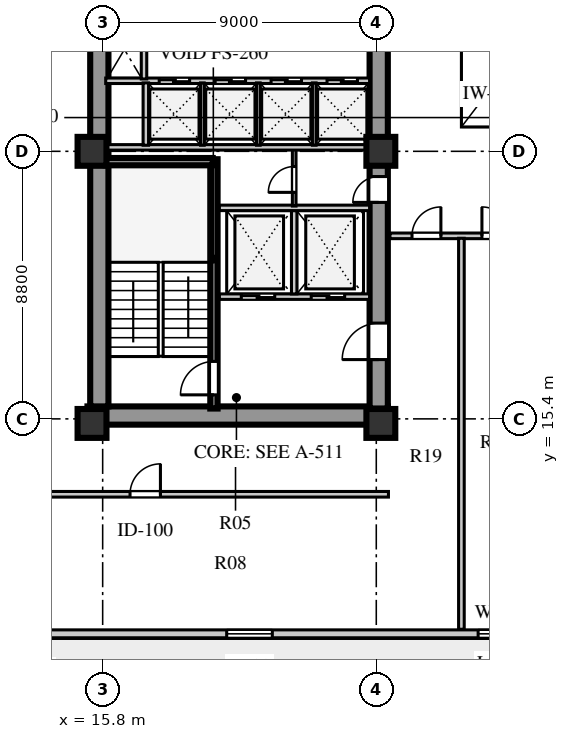
"""IFC4 building model, lengths in metres.
Left out: names, types, materials, properties, quantities, classifications, styles, units other than length and angle.
Written with IfcOpenShell. Run it as: python <this file> out.ifc"""

import sys

from ifc_helpers import new_model, si_unit, direction, frame, frame_2d, origin, origin_2d, place, context, subcontext, project, spatial, rectangle, extrude, element, fill, save


model = new_model("IFC4")
c1 = context("Model", 3, precision=1e-05, world=origin(), true_north=direction((0.0, 1.0)))
c2 = subcontext(c1, "Body", "Model", "MODEL_VIEW")
j1 = project(units=[si_unit("LENGTHUNIT", "METRE"), si_unit("PLANEANGLEUNIT", "RADIAN")], contexts=[c1])
p1 = place(None, origin())
s1 = spatial("IfcSite", under=j1, at=p1, CompositionType="ELEMENT")
p2 = place(p1, origin())
s2 = spatial("IfcBuilding", under=s1, at=p2, CompositionType="ELEMENT")
p3 = place(p2, frame((0.0, 0.0, 82.0)))
s3 = spatial("IfcBuildingStorey", under=s2, at=p3, CompositionType="ELEMENT", Elevation=82.0)
p4 = place(p3, frame((15.3, 15.51, 0.0), z_axis=(0.0, 0.0, 1.0), x_axis=(1.0, 0.0, 0.0)))
e1 = element("IfcWall", 1, at=p4, inside=s3, PredefinedType="SHEAR", context=c2, shape_type="SweptSolid", body=[
    extrude(rectangle(XDim=9.88, YDim=0.6, at=frame_2d((4.94, 0.0))), origin(), (0.0, 0.0, 1.0), 3.74),
])
p5 = place(p3, frame((15.69, 15.81, 0.0), z_axis=(0.0, 0.0, 1.0), x_axis=(0.0, 1.0, 0.0)))
e2 = element("IfcWall", 2, at=p5, inside=s3, PredefinedType="SHEAR", context=c2, shape_type="SweptSolid", body=[
    extrude(rectangle(XDim=25.63, YDim=0.6, at=frame_2d((12.815, 0.0))), origin(), (0.0, 0.0, 1.0), 3.74),
])
p6 = place(p3, frame((24.88, 15.74, 0.0), z_axis=(0.0, 0.0, 1.0), x_axis=(0.0, 1.0, 0.0)))
e3 = element("IfcWall", 3, at=p6, inside=s3, PredefinedType="SHEAR", context=c2, shape_type="SweptSolid", body=[
    extrude(rectangle(XDim=25.76, YDim=0.6, at=frame_2d((12.88, 0.0))), origin(), (0.0, 0.0, 1.0), 3.74),
])
p7 = place(p6, frame((1.61, 0.0, 0.0)))
e4 = element("IfcOpeningElement", 4, at=p7, cuts=e3, PredefinedType="OPENING", context=c2, shape_type="SweptSolid", body=[
    extrude(rectangle(XDim=1.2, YDim=2.1, at=frame_2d((0.6, 1.05))), frame((0.0, 0.31, 0.0), z_axis=(0.0, -1.0, 0.0), x_axis=(1.0, 0.0, 0.0)), (0.0, 0.0, 1.0), 0.62),
])
p8 = place(p6, frame((6.78, 0.0, 0.0)))
e5 = element("IfcOpeningElement", 5, at=p8, cuts=e3, PredefinedType="OPENING", context=c2, shape_type="SweptSolid", body=[
    extrude(rectangle(XDim=0.85, YDim=2.06, at=frame_2d((0.425, 1.03))), frame((0.0, 0.31, 0.0), z_axis=(0.0, -1.0, 0.0), x_axis=(1.0, 0.0, 0.0)), (0.0, 0.0, 1.0), 0.62),
])
p9 = place(p6, frame((12.11, 0.0, 0.0)))
e6 = element("IfcOpeningElement", 6, at=p9, cuts=e3, PredefinedType="OPENING", context=c2, shape_type="SweptSolid", body=[
    extrude(rectangle(XDim=1.5, YDim=2.12, at=frame_2d((0.75, 1.06))), frame((0.0, 0.31, 0.0), z_axis=(0.0, -1.0, 0.0), x_axis=(1.0, 0.0, 0.0)), (0.0, 0.0, 1.0), 0.62),
])
p10 = place(p6, frame((20.11, 0.0, 0.0)))
e7 = element("IfcOpeningElement", 7, at=p10, cuts=e3, PredefinedType="OPENING", context=c2, shape_type="SweptSolid", body=[
    extrude(rectangle(XDim=1.2, YDim=2.12, at=frame_2d((0.6, 1.06))), frame((0.0, 0.31, 0.0), z_axis=(0.0, -1.0, 0.0), x_axis=(1.0, 0.0, 0.0)), (0.0, 0.0, 1.0), 0.62),
])
p11 = place(p6, frame((24.01, 0.0, 0.0)))
e8 = element("IfcOpeningElement", 8, at=p11, cuts=e3, PredefinedType="OPENING", context=c2, shape_type="SweptSolid", body=[
    extrude(rectangle(XDim=0.95, YDim=2.1, at=frame_2d((0.475, 1.05))), frame((0.0, 0.31, 0.0), z_axis=(0.0, -1.0, 0.0), x_axis=(1.0, 0.0, 0.0)), (0.0, 0.0, 1.0), 0.62),
])
for number, where, z_axis, x_axis in (
    (9, (15.45, 15.25, 0.0), (0.0, 0.0, 1.0), (1.0, 0.0, 0.0)),
    (10, (15.45, 24.2, 0.0), (0.0, 0.0, 1.0), (1.0, 0.0, 0.0)),
    (11, (24.95, 15.25, 0.0), (0.0, 0.0, 1.0), (1.0, 0.0, 0.0)),
    (12, (24.95, 24.2, 0.0), (0.0, 0.0, 1.0), (1.0, 0.0, 0.0)),
):
    element("IfcColumn", number, at=place(p3, frame(where, z_axis=z_axis, x_axis=x_axis)), inside=s3, PredefinedType="COLUMN", context=c2, shape_type="SweptSolid", body=[
        extrude(rectangle(XDim=0.95, YDim=0.95, at=origin_2d()), origin(), (0.0, 0.0, 1.0), 3.74),
    ])
p12 = place(p3, frame((12.0, 8.33, 0.0), z_axis=(0.0, 0.0, 1.0), x_axis=(1.0, 0.0, 0.0)))
e13 = element("IfcWall", 13, at=p12, inside=s3, PredefinedType="SOLIDWALL", context=c2, shape_type="SweptSolid", body=[
    extrude(rectangle(XDim=34.6, YDim=0.26, at=frame_2d((17.3, 0.0))), origin(), (0.0, 0.0, 1.0), 3.74),
])
p13 = place(p12, frame((0.95, 0.0, 0.0)))
e14 = element("IfcOpeningElement", 14, at=p13, cuts=e13, PredefinedType="OPENING", context=c2, shape_type="SweptSolid", body=[
    extrude(rectangle(XDim=1.0, YDim=2.05, at=frame_2d((0.5, 1.025))), frame((0.0, 0.14, 0.0), z_axis=(0.0, -1.0, 0.0), x_axis=(1.0, 0.0, 0.0)), (0.0, 0.0, 1.0), 0.28),
])
p14 = place(p12, frame((7.88, 0.0, 0.8)))
e15 = element("IfcOpeningElement", 15, at=p14, cuts=e13, PredefinedType="OPENING", context=c2, shape_type="SweptSolid", body=[
    extrude(rectangle(XDim=1.5, YDim=2.0, at=frame_2d((0.75, 1.0))), frame((0.0, 0.14, 0.0), z_axis=(0.0, -1.0, 0.0), x_axis=(1.0, 0.0, 0.0)), (0.0, 0.0, 1.0), 0.28),
])
p15 = place(p12, frame((16.15, 0.0, 0.8)))
e16 = element("IfcOpeningElement", 16, at=p15, cuts=e13, PredefinedType="OPENING", context=c2, shape_type="SweptSolid", body=[
    extrude(rectangle(XDim=1.2, YDim=1.75, at=frame_2d((0.6, 0.875))), frame((0.0, 0.14, 0.0), z_axis=(0.0, -1.0, 0.0), x_axis=(1.0, 0.0, 0.0)), (0.0, 0.0, 1.0), 0.28),
])
p16 = place(p12, frame((18.45, 0.0, 0.8)))
e17 = element("IfcOpeningElement", 17, at=p16, cuts=e13, PredefinedType="OPENING", context=c2, shape_type="SweptSolid", body=[
    extrude(rectangle(XDim=1.2, YDim=1.75, at=frame_2d((0.6, 0.875))), frame((0.0, 0.14, 0.0), z_axis=(0.0, -1.0, 0.0), x_axis=(1.0, 0.0, 0.0)), (0.0, 0.0, 1.0), 0.28),
])
p17 = place(p12, frame((20.75, 0.0, 0.8)))
e18 = element("IfcOpeningElement", 18, at=p17, cuts=e13, PredefinedType="OPENING", context=c2, shape_type="SweptSolid", body=[
    extrude(rectangle(XDim=1.2, YDim=1.75, at=frame_2d((0.6, 0.875))), frame((0.0, 0.14, 0.0), z_axis=(0.0, -1.0, 0.0), x_axis=(1.0, 0.0, 0.0)), (0.0, 0.0, 1.0), 0.28),
])
p18 = place(p12, frame((29.63, 0.0, 0.8)))
e19 = element("IfcOpeningElement", 19, at=p18, cuts=e13, PredefinedType="OPENING", context=c2, shape_type="SweptSolid", body=[
    extrude(rectangle(XDim=1.35, YDim=1.9, at=frame_2d((0.675, 0.95))), frame((0.0, 0.14, 0.0), z_axis=(0.0, -1.0, 0.0), x_axis=(1.0, 0.0, 0.0)), (0.0, 0.0, 1.0), 0.28),
])
p19 = place(p3, frame((19.46, 15.74, 0.0), z_axis=(0.0, 0.0, 1.0), x_axis=(0.0, 1.0, 0.0)))
e20 = element("IfcWall", 20, at=p19, inside=s3, PredefinedType="SHEAR", context=c2, shape_type="SweptSolid", body=[
    extrude(rectangle(XDim=8.2, YDim=0.24, at=frame_2d((4.1, 0.0))), origin(), (0.0, 0.0, 1.0), 4.0),
])
p20 = place(p19, frame((0.45, 0.0, 0.0)))
e21 = element("IfcOpeningElement", 21, at=p20, cuts=e20, PredefinedType="OPENING", context=c2, shape_type="SweptSolid", body=[
    extrude(rectangle(XDim=1.1, YDim=2.1, at=frame_2d((0.55, 1.05))), frame((0.0, 0.13, 0.0), z_axis=(0.0, -1.0, 0.0), x_axis=(1.0, 0.0, 0.0)), (0.0, 0.0, 1.0), 0.26),
])
p21 = place(p3, frame((15.9, 23.86, 0.0), z_axis=(0.0, 0.0, 1.0), x_axis=(1.0, 0.0, 0.0)))
e22 = element("IfcWall", 22, at=p21, inside=s3, PredefinedType="SHEAR", context=c2, shape_type="SweptSolid", body=[
    extrude(rectangle(XDim=3.52, YDim=0.24, at=frame_2d((1.76, 0.0))), origin(), (0.0, 0.0, 1.0), 4.0),
])
p22 = place(p3, frame((19.64, 19.42, 0.0), z_axis=(0.0, 0.0, 1.0), x_axis=(1.0, 0.0, 0.0)))
e23 = element("IfcWall", 23, at=p22, inside=s3, PredefinedType="SOLIDWALL", context=c2, shape_type="SweptSolid", body=[
    extrude(rectangle(XDim=4.94, YDim=0.18, at=frame_2d((2.47, 0.0))), origin(), (0.0, 0.0, 1.0), 3.74),
])
p23 = place(p22, frame((0.72, 0.0, 0.0)))
e24 = element("IfcOpeningElement", 24, at=p23, cuts=e23, PredefinedType="OPENING", context=c2, shape_type="SweptSolid", body=[
    extrude(rectangle(XDim=1.1, YDim=2.1, at=frame_2d((0.55, 1.05))), frame((0.0, 0.1, 0.0), z_axis=(0.0, -1.0, 0.0), x_axis=(1.0, 0.0, 0.0)), (0.0, 0.0, 1.0), 0.2),
])
p24 = place(p22, frame((3.02, 0.0, 0.0)))
e25 = element("IfcOpeningElement", 25, at=p24, cuts=e23, PredefinedType="OPENING", context=c2, shape_type="SweptSolid", body=[
    extrude(rectangle(XDim=1.1, YDim=2.1, at=frame_2d((0.55, 1.05))), frame((0.0, 0.1, 0.0), z_axis=(0.0, -1.0, 0.0), x_axis=(1.0, 0.0, 0.0)), (0.0, 0.0, 1.0), 0.2),
])
p25 = place(p3, frame((22.1, 19.51, 0.0), z_axis=(0.0, 0.0, 1.0), x_axis=(0.0, 1.0, 0.0)))
e26 = element("IfcWall", 26, at=p25, inside=s3, PredefinedType="SOLIDWALL", context=c2, shape_type="SweptSolid", body=[
    extrude(rectangle(XDim=2.74, YDim=0.18, at=frame_2d((1.37, 0.0))), origin(), (0.0, 0.0, 1.0), 3.74),
])
p26 = place(p3, frame((19.64, 22.34, 0.0), z_axis=(0.0, 0.0, 1.0), x_axis=(1.0, 0.0, 0.0)))
e27 = element("IfcWall", 27, at=p26, inside=s3, PredefinedType="SOLIDWALL", context=c2, shape_type="SweptSolid", body=[
    extrude(rectangle(XDim=4.94, YDim=0.18, at=frame_2d((2.47, 0.0))), origin(), (0.0, 0.0, 1.0), 3.74),
])
p27 = place(p3, frame((22.1, 22.4, 0.0), z_axis=(0.0, 0.0, 1.0), x_axis=(0.0, 1.0, 0.0)))
e28 = element("IfcWall", 28, at=p27, inside=s3, PredefinedType="PARTITIONING", context=c2, shape_type="SweptSolid", body=[
    extrude(rectangle(XDim=1.88, YDim=0.12, at=frame_2d((0.94, 0.0))), origin(), (0.0, 0.0, 1.0), 3.74),
])
p28 = place(p27, frame((0.45, 0.0, 0.0)))
e29 = element("IfcOpeningElement", 29, at=p28, cuts=e28, PredefinedType="OPENING", context=c2, shape_type="SweptSolid", body=[
    extrude(rectangle(XDim=0.85, YDim=2.06, at=frame_2d((0.425, 1.03))), frame((0.0, 0.07, 0.0), z_axis=(0.0, -1.0, 0.0), x_axis=(1.0, 0.0, 0.0)), (0.0, 0.0, 1.0), 0.14),
])
p29 = place(p3, frame((15.9, 26.52, 0.0), z_axis=(0.0, 0.0, 1.0), x_axis=(1.0, 0.0, 0.0)))
e30 = element("IfcWall", 30, at=p29, inside=s3, PredefinedType="SOLIDWALL", context=c2, shape_type="SweptSolid", body=[
    extrude(rectangle(XDim=8.68, YDim=0.18, at=frame_2d((4.34, 0.0))), origin(), (0.0, 0.0, 1.0), 3.74),
])
p30 = place(p29, frame((1.76, 0.0, 0.0)))
e31 = element("IfcOpeningElement", 31, at=p30, cuts=e30, PredefinedType="OPENING", context=c2, shape_type="SweptSolid", body=[
    extrude(rectangle(XDim=1.0, YDim=2.1, at=frame_2d((0.5, 1.05))), frame((0.0, 0.1, 0.0), z_axis=(0.0, -1.0, 0.0), x_axis=(1.0, 0.0, 0.0)), (0.0, 0.0, 1.0), 0.2),
])
p31 = place(p29, frame((3.6, 0.0, 0.0)))
e32 = element("IfcOpeningElement", 32, at=p31, cuts=e30, PredefinedType="OPENING", context=c2, shape_type="SweptSolid", body=[
    extrude(rectangle(XDim=1.0, YDim=2.1, at=frame_2d((0.5, 1.05))), frame((0.0, 0.1, 0.0), z_axis=(0.0, -1.0, 0.0), x_axis=(1.0, 0.0, 0.0)), (0.0, 0.0, 1.0), 0.2),
])
p32 = place(p29, frame((5.44, 0.0, 0.0)))
e33 = element("IfcOpeningElement", 33, at=p32, cuts=e30, PredefinedType="OPENING", context=c2, shape_type="SweptSolid", body=[
    extrude(rectangle(XDim=1.0, YDim=2.1, at=frame_2d((0.5, 1.05))), frame((0.0, 0.1, 0.0), z_axis=(0.0, -1.0, 0.0), x_axis=(1.0, 0.0, 0.0)), (0.0, 0.0, 1.0), 0.2),
])
p33 = place(p29, frame((7.28, 0.0, 0.0)))
e34 = element("IfcOpeningElement", 34, at=p33, cuts=e30, PredefinedType="OPENING", context=c2, shape_type="SweptSolid", body=[
    extrude(rectangle(XDim=1.0, YDim=2.1, at=frame_2d((0.5, 1.05))), frame((0.0, 0.1, 0.0), z_axis=(0.0, -1.0, 0.0), x_axis=(1.0, 0.0, 0.0)), (0.0, 0.0, 1.0), 0.2),
])
p34 = place(p3, frame((15.9, 24.33, 0.0), z_axis=(0.0, 0.0, 1.0), x_axis=(1.0, 0.0, 0.0)))
e35 = element("IfcWall", 35, at=p34, inside=s3, PredefinedType="SOLIDWALL", context=c2, shape_type="SweptSolid", body=[
    extrude(rectangle(XDim=8.68, YDim=0.18, at=frame_2d((4.34, 0.0))), origin(), (0.0, 0.0, 1.0), 3.04),
])
p35 = place(p3, frame((17.22, 24.4, 0.0), z_axis=(0.0, 0.0, 1.0), x_axis=(0.0, 1.0, 0.0)))
e36 = element("IfcWall", 36, at=p35, inside=s3, PredefinedType="SOLIDWALL", context=c2, shape_type="SweptSolid", body=[
    extrude(rectangle(XDim=2.05, YDim=0.18, at=frame_2d((1.025, 0.0))), origin(), (0.0, 0.0, 1.0), 3.74),
])
for number, where, z_axis, x_axis in (
    (37, (19.08, 24.4, 0.0), (0.0, 0.0, 1.0), (0.0, 1.0, 0.0)),
    (38, (20.92, 24.4, 0.0), (0.0, 0.0, 1.0), (0.0, 1.0, 0.0)),
    (39, (22.76, 24.4, 0.0), (0.0, 0.0, 1.0), (0.0, 1.0, 0.0)),
):
    element("IfcWall", number, at=place(p3, frame(where, z_axis=z_axis, x_axis=x_axis)), inside=s3, PredefinedType="PARTITIONING", context=c2, shape_type="SweptSolid", body=[
        extrude(rectangle(XDim=2.05, YDim=0.12, at=frame_2d((1.025, 0.0))), origin(), (0.0, 0.0, 1.0), 3.74),
    ])
p36 = place(p3, frame((17.16, 26.58, 0.0), z_axis=(0.0, 0.0, 1.0), x_axis=(0.0, 1.0, 0.0)))
e40 = element("IfcWall", 40, at=p36, inside=s3, PredefinedType="SOLIDWALL", context=c2, shape_type="SweptSolid", body=[
    extrude(rectangle(XDim=4.02, YDim=0.18, at=frame_2d((2.01, 0.0))), origin(), (0.0, 0.0, 1.0), 3.74),
])
p37 = place(p36, frame((2.35, 0.0, 0.0)))
e41 = element("IfcOpeningElement", 41, at=p37, cuts=e40, PredefinedType="OPENING", context=c2, shape_type="SweptSolid", body=[
    extrude(rectangle(XDim=0.85, YDim=2.06, at=frame_2d((0.425, 1.03))), frame((0.0, 0.1, 0.0), z_axis=(0.0, -1.0, 0.0), x_axis=(1.0, 0.0, 0.0)), (0.0, 0.0, 1.0), 0.2),
])
p38 = place(p3, frame((25.25, 21.42, 0.0), z_axis=(0.0, 0.0, 1.0), x_axis=(1.0, 0.0, 0.0)))
e42 = element("IfcWall", 42, at=p38, inside=s3, PredefinedType="SOLIDWALL", context=c2, shape_type="SweptSolid", body=[
    extrude(rectangle(XDim=12.87, YDim=0.185, at=frame_2d((6.435, 0.0))), origin(), (0.0, 0.0, 1.0), 3.34),
])
p39 = place(p38, frame((0.725, 0.0, 0.0)))
e43 = element("IfcOpeningElement", 43, at=p39, cuts=e42, PredefinedType="OPENING", context=c2, shape_type="SweptSolid", body=[
    extrude(rectangle(XDim=0.95, YDim=2.08, at=frame_2d((0.475, 1.04))), frame((0.0, 0.103, 0.0), z_axis=(0.0, -1.0, 0.0), x_axis=(1.0, 0.0, 0.0)), (0.0, 0.0, 1.0), 0.205),
])
p40 = place(p38, frame((3.025, 0.0, 0.0)))
e44 = element("IfcOpeningElement", 44, at=p40, cuts=e42, PredefinedType="OPENING", context=c2, shape_type="SweptSolid", body=[
    extrude(rectangle(XDim=0.95, YDim=2.08, at=frame_2d((0.475, 1.04))), frame((0.0, 0.103, 0.0), z_axis=(0.0, -1.0, 0.0), x_axis=(1.0, 0.0, 0.0)), (0.0, 0.0, 1.0), 0.205),
])
p41 = place(p38, frame((5.325, 0.0, 0.0)))
e45 = element("IfcOpeningElement", 45, at=p41, cuts=e42, PredefinedType="OPENING", context=c2, shape_type="SweptSolid", body=[
    extrude(rectangle(XDim=0.95, YDim=2.08, at=frame_2d((0.475, 1.04))), frame((0.0, 0.103, 0.0), z_axis=(0.0, -1.0, 0.0), x_axis=(1.0, 0.0, 0.0)), (0.0, 0.0, 1.0), 0.205),
])
p42 = place(p38, frame((7.625, 0.0, 0.0)))
e46 = element("IfcOpeningElement", 46, at=p42, cuts=e42, PredefinedType="OPENING", context=c2, shape_type="SweptSolid", body=[
    extrude(rectangle(XDim=0.95, YDim=2.08, at=frame_2d((0.475, 1.04))), frame((0.0, 0.103, 0.0), z_axis=(0.0, -1.0, 0.0), x_axis=(1.0, 0.0, 0.0)), (0.0, 0.0, 1.0), 0.205),
])
p43 = place(p38, frame((9.725, 0.0, 0.0)))
e47 = element("IfcOpeningElement", 47, at=p43, cuts=e42, PredefinedType="OPENING", context=c2, shape_type="SweptSolid", body=[
    extrude(rectangle(XDim=0.95, YDim=2.08, at=frame_2d((0.475, 1.04))), frame((0.0, 0.103, 0.0), z_axis=(0.0, -1.0, 0.0), x_axis=(1.0, 0.0, 0.0)), (0.0, 0.0, 1.0), 0.205),
])
p44 = place(p38, frame((11.495, 0.0, 0.0)))
e48 = element("IfcOpeningElement", 48, at=p44, cuts=e42, PredefinedType="OPENING", context=c2, shape_type="SweptSolid", body=[
    extrude(rectangle(XDim=0.95, YDim=2.08, at=frame_2d((0.475, 1.04))), frame((0.0, 0.103, 0.0), z_axis=(0.0, -1.0, 0.0), x_axis=(1.0, 0.0, 0.0)), (0.0, 0.0, 1.0), 0.205),
])
p45 = place(p3, frame((10.5, 12.92, 0.0), z_axis=(0.0, 0.0, 1.0), x_axis=(1.0, 0.0, 0.0)))
e49 = element("IfcWall", 49, at=p45, inside=s3, PredefinedType="SOLIDWALL", context=c2, shape_type="SweptSolid", body=[
    extrude(rectangle(XDim=14.7, YDim=0.185, at=frame_2d((7.35, 0.0))), origin(), (0.0, 0.0, 1.0), 3.74),
])
p46 = place(p45, frame((6.2, 0.0, 0.0)))
e50 = element("IfcOpeningElement", 50, at=p46, cuts=e49, PredefinedType="OPENING", context=c2, shape_type="SweptSolid", body=[
    extrude(rectangle(XDim=1.0, YDim=2.08, at=frame_2d((0.5, 1.04))), frame((0.0, 0.103, 0.0), z_axis=(0.0, -1.0, 0.0), x_axis=(1.0, 0.0, 0.0)), (0.0, 0.0, 1.0), 0.205),
])
p47 = place(p3, frame((27.6, 8.48, 0.0), z_axis=(0.0, 0.0, 1.0), x_axis=(0.0, 1.0, 0.0)))
e51 = element("IfcWall", 51, at=p47, inside=s3, PredefinedType="SOLIDWALL", context=c2, shape_type="SweptSolid", body=[
    extrude(rectangle(XDim=12.86, YDim=0.185, at=frame_2d((6.43, 0.0))), origin(), (0.0, 0.0, 1.0), 3.74),
])
p48 = place(p14, origin())
e52 = element("IfcWindow", 52, at=p48, inside=s3, PartitioningType="SINGLE_PANEL", PredefinedType="WINDOW", context=c2, shape_type="SweptSolid", body=[
    extrude(rectangle(XDim=1.5, YDim=2.0, at=frame_2d((0.75, 1.0))), frame((0.0, 0.03, 0.0), z_axis=(0.0, -1.0, 0.0), x_axis=(1.0, 0.0, 0.0)), (0.0, 0.0, 1.0), 0.06),
])
fill(e15, e52)
p49 = place(p15, origin())
e53 = element("IfcWindow", 53, at=p49, inside=s3, PartitioningType="SINGLE_PANEL", PredefinedType="WINDOW", context=c2, shape_type="SweptSolid", body=[
    extrude(rectangle(XDim=1.2, YDim=1.75, at=frame_2d((0.6, 0.875))), frame((0.0, 0.03, 0.0), z_axis=(0.0, -1.0, 0.0), x_axis=(1.0, 0.0, 0.0)), (0.0, 0.0, 1.0), 0.06),
])
fill(e16, e53)
p50 = place(p20, origin())
e54 = element("IfcDoor", 54, at=p50, inside=s3, OperationType="SINGLE_SWING_LEFT", PredefinedType="DOOR", context=c2, shape_type="SweptSolid", body=[
    extrude(rectangle(XDim=1.1, YDim=2.1, at=frame_2d((0.55, 1.05))), frame((0.0, 0.025, 0.0), z_axis=(0.0, -1.0, 0.0), x_axis=(1.0, 0.0, 0.0)), (0.0, 0.0, 1.0), 0.05),
])
fill(e21, e54)
p51 = place(p23, origin())
e55 = element("IfcDoor", 55, at=p51, inside=s3, OperationType="DOUBLE_DOOR_SLIDING", PredefinedType="DOOR", context=c2, shape_type="SweptSolid", body=[
    extrude(rectangle(XDim=1.1, YDim=2.1, at=frame_2d((0.55, 1.05))), frame((0.0, 0.025, 0.0), z_axis=(0.0, -1.0, 0.0), x_axis=(1.0, 0.0, 0.0)), (0.0, 0.0, 1.0), 0.05),
])
fill(e24, e55)
p52 = place(p24, origin())
e56 = element("IfcDoor", 56, at=p52, inside=s3, OperationType="DOUBLE_DOOR_SLIDING", PredefinedType="DOOR", context=c2, shape_type="SweptSolid", body=[
    extrude(rectangle(XDim=1.1, YDim=2.1, at=frame_2d((0.55, 1.05))), frame((0.0, 0.025, 0.0), z_axis=(0.0, -1.0, 0.0), x_axis=(1.0, 0.0, 0.0)), (0.0, 0.0, 1.0), 0.05),
])
fill(e25, e56)
p53 = place(p7, frame((1.2, 0.0, 0.0), z_axis=(0.0, 0.0, 1.0), x_axis=(-1.0, 0.0, 0.0)))
e57 = element("IfcDoor", 57, at=p53, inside=s3, OperationType="SINGLE_SWING_RIGHT", PredefinedType="DOOR", context=c2, shape_type="SweptSolid", body=[
    extrude(rectangle(XDim=1.2, YDim=2.1, at=frame_2d((0.6, 1.05))), frame((0.0, 0.025, 0.0), z_axis=(0.0, -1.0, 0.0), x_axis=(1.0, 0.0, 0.0)), (0.0, 0.0, 1.0), 0.05),
])
fill(e4, e57)
p54 = place(p28, origin())
e58 = element("IfcDoor", 58, at=p54, inside=s3, OperationType="SINGLE_SWING_LEFT", PredefinedType="DOOR", context=c2, shape_type="SweptSolid", body=[
    extrude(rectangle(XDim=0.85, YDim=2.06, at=frame_2d((0.425, 1.03))), frame((0.0, 0.025, 0.0), z_axis=(0.0, -1.0, 0.0), x_axis=(1.0, 0.0, 0.0)), (0.0, 0.0, 1.0), 0.05),
])
fill(e29, e58)
p55 = place(p8, frame((0.85, 0.0, 0.0), z_axis=(0.0, 0.0, 1.0), x_axis=(-1.0, 0.0, 0.0)))
e59 = element("IfcDoor", 59, at=p55, inside=s3, OperationType="SINGLE_SWING_RIGHT", PredefinedType="DOOR", context=c2, shape_type="SweptSolid", body=[
    extrude(rectangle(XDim=0.85, YDim=2.06, at=frame_2d((0.425, 1.03))), frame((0.0, 0.025, 0.0), z_axis=(0.0, -1.0, 0.0), x_axis=(1.0, 0.0, 0.0)), (0.0, 0.0, 1.0), 0.05),
])
fill(e5, e59)
p56 = place(p30, origin())
e60 = element("IfcDoor", 60, at=p56, inside=s3, OperationType="DOUBLE_DOOR_SLIDING", PredefinedType="DOOR", context=c2, shape_type="SweptSolid", body=[
    extrude(rectangle(XDim=1.0, YDim=2.1, at=frame_2d((0.5, 1.05))), frame((0.0, 0.025, 0.0), z_axis=(0.0, -1.0, 0.0), x_axis=(1.0, 0.0, 0.0)), (0.0, 0.0, 1.0), 0.05),
])
fill(e31, e60)
p57 = place(p31, origin())
e61 = element("IfcDoor", 61, at=p57, inside=s3, OperationType="DOUBLE_DOOR_SLIDING", PredefinedType="DOOR", context=c2, shape_type="SweptSolid", body=[
    extrude(rectangle(XDim=1.0, YDim=2.1, at=frame_2d((0.5, 1.05))), frame((0.0, 0.025, 0.0), z_axis=(0.0, -1.0, 0.0), x_axis=(1.0, 0.0, 0.0)), (0.0, 0.0, 1.0), 0.05),
])
fill(e32, e61)
p58 = place(p32, origin())
e62 = element("IfcDoor", 62, at=p58, inside=s3, OperationType="DOUBLE_DOOR_SLIDING", PredefinedType="DOOR", context=c2, shape_type="SweptSolid", body=[
    extrude(rectangle(XDim=1.0, YDim=2.1, at=frame_2d((0.5, 1.05))), frame((0.0, 0.025, 0.0), z_axis=(0.0, -1.0, 0.0), x_axis=(1.0, 0.0, 0.0)), (0.0, 0.0, 1.0), 0.05),
])
fill(e33, e62)
p59 = place(p33, origin())
e63 = element("IfcDoor", 63, at=p59, inside=s3, OperationType="DOUBLE_DOOR_SLIDING", PredefinedType="DOOR", context=c2, shape_type="SweptSolid", body=[
    extrude(rectangle(XDim=1.0, YDim=2.1, at=frame_2d((0.5, 1.05))), frame((0.0, 0.025, 0.0), z_axis=(0.0, -1.0, 0.0), x_axis=(1.0, 0.0, 0.0)), (0.0, 0.0, 1.0), 0.05),
])
fill(e34, e63)
p60 = place(p46, frame((1.0, 0.0, 0.0), z_axis=(0.0, 0.0, 1.0), x_axis=(-1.0, 0.0, 0.0)))
e64 = element("IfcDoor", 64, at=p60, inside=s3, OperationType="SINGLE_SWING_LEFT", PredefinedType="DOOR", context=c2, shape_type="SweptSolid", body=[
    extrude(rectangle(XDim=1.0, YDim=2.08, at=frame_2d((0.5, 1.04))), frame((0.0, 0.025, 0.0), z_axis=(0.0, -1.0, 0.0), x_axis=(1.0, 0.0, 0.0)), (0.0, 0.0, 1.0), 0.05),
])
fill(e50, e64)
p61 = place(p39, frame((0.95, 0.0, 0.0), z_axis=(0.0, 0.0, 1.0), x_axis=(-1.0, 0.0, 0.0)))
e65 = element("IfcDoor", 65, at=p61, inside=s3, OperationType="SINGLE_SWING_LEFT", PredefinedType="DOOR", context=c2, shape_type="SweptSolid", body=[
    extrude(rectangle(XDim=0.95, YDim=2.08, at=frame_2d((0.475, 1.04))), frame((0.0, 0.025, 0.0), z_axis=(0.0, -1.0, 0.0), x_axis=(1.0, 0.0, 0.0)), (0.0, 0.0, 1.0), 0.05),
])
fill(e43, e65)
p62 = place(p40, frame((0.95, 0.0, 0.0), z_axis=(0.0, 0.0, 1.0), x_axis=(-1.0, 0.0, 0.0)))
e66 = element("IfcDoor", 66, at=p62, inside=s3, OperationType="SINGLE_SWING_RIGHT", PredefinedType="DOOR", context=c2, shape_type="SweptSolid", body=[
    extrude(rectangle(XDim=0.95, YDim=2.08, at=frame_2d((0.475, 1.04))), frame((0.0, 0.025, 0.0), z_axis=(0.0, -1.0, 0.0), x_axis=(1.0, 0.0, 0.0)), (0.0, 0.0, 1.0), 0.05),
])
fill(e44, e66)
save(model, sys.argv[1])
